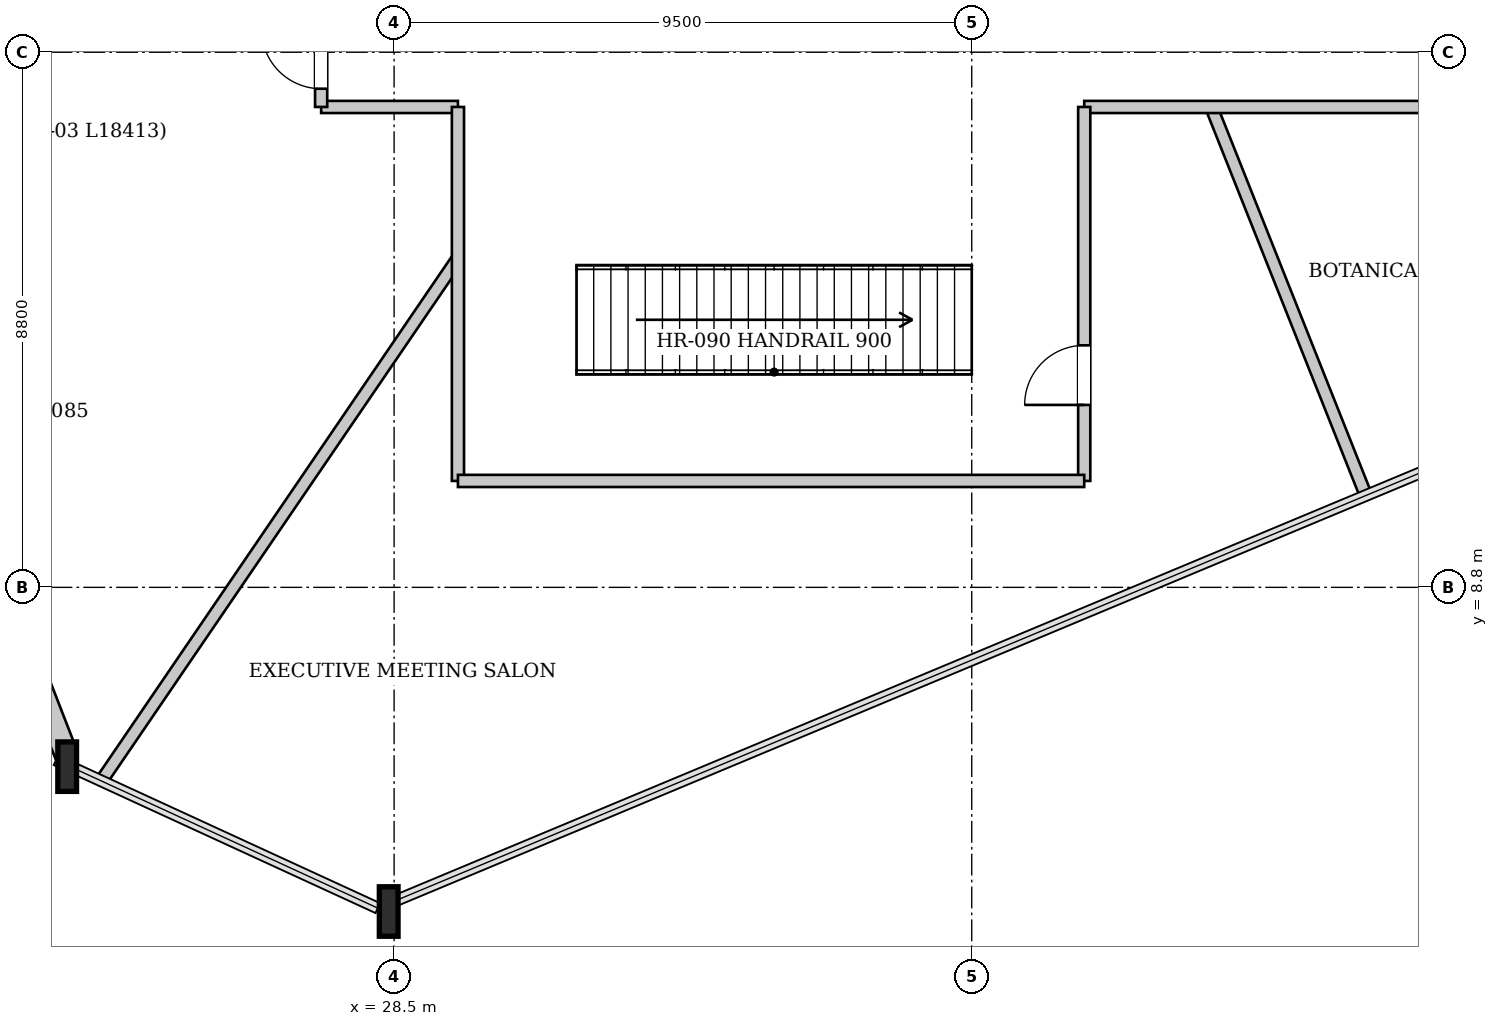
"""IFC4 building model, lengths in metres.
Left out: names, types, materials, properties, quantities, classifications, styles, units other than length and angle.
Written with IfcOpenShell. Run it as: python <this file> out.ifc"""

import sys

from ifc_helpers import new_model, si_unit, direction, frame, frame_2d, origin, origin_2d, place, context, subcontext, project, spatial, rectangle, i_section, extrude, source, transform, mapped, element, fill, save


model = new_model("IFC4")
c1 = context("Model", 3, precision=1e-05, world=origin(), true_north=direction((0.0, 1.0)))
c2 = subcontext(c1, "Body", "Model", "MODEL_VIEW")
j1 = project(units=[si_unit("LENGTHUNIT", "METRE"), si_unit("PLANEANGLEUNIT", "RADIAN")], contexts=[c1])
p1 = place(None, origin())
s1 = spatial("IfcSite", under=j1, at=p1, CompositionType="ELEMENT")
p2 = place(p1, origin())
s2 = spatial("IfcBuilding", under=s1, at=p2, CompositionType="ELEMENT")
p3 = place(p2, frame((0.0, 0.0, 71.9)))
s3 = spatial("IfcBuildingStorey", under=s2, at=p3, CompositionType="ELEMENT", Elevation=71.9)
m1 = source(origin(), c2, "Body", "SweptSolid", [
    extrude(i_section(OverallWidth=0.308, OverallDepth=0.814, WebThickness=0.021, FlangeThickness=0.04, at=origin_2d()), origin(), (0.0, 0.0, 1.0), 3.859),
])
p4 = place(p3, frame((22.939, 5.959, 0.0), z_axis=(0.095281359124, -0.055992033748, 0.99387441599), x_axis=(0.506644802413, 0.862154884106, 0.0)))
e1 = element("IfcColumn", 1, at=p4, inside=s3, PredefinedType="COLUMN", context=c2, shape_type="MappedRepresentation", body=[
    mapped(m1, transform((0.0, 0.0, 0.0), x_axis=(1.0, 0.0, 0.0), y_axis=(0.0, 1.0, 0.0), z_axis=(0.0, 0.0, 1.0), scale=1.0)),
])
m2 = source(origin(), c2, "Body", "SweptSolid", [
    extrude(i_section(OverallWidth=0.308, OverallDepth=0.814, WebThickness=0.021, FlangeThickness=0.04, at=origin_2d()), origin(), (0.0, 0.0, 1.0), 3.854),
])
p5 = place(p3, frame((28.232, 3.525, 0.0), z_axis=(0.093067685296, -0.029079692002, 0.995235036294), x_axis=(0.29823799613, 0.954491538812, 0.0)))
e2 = element("IfcColumn", 2, at=p5, inside=s3, PredefinedType="COLUMN", context=c2, shape_type="MappedRepresentation", body=[
    mapped(m2, transform((0.0, 0.0, 0.0), x_axis=(1.0, 0.0, 0.0), y_axis=(0.0, 1.0, 0.0), z_axis=(0.0, 0.0, 1.0), scale=1.0)),
])
p6 = place(p3, frame((23.116, 6.028, 0.0), z_axis=(0.0, 0.0, 1.0), x_axis=(-0.362290127774, 0.932065375023, 0.0)))
e3 = element("IfcWall", 3, at=p6, inside=s3, PredefinedType="SOLIDWALL", context=c2, shape_type="SweptSolid", body=[
    extrude(rectangle(XDim=18.412, YDim=0.38, at=frame_2d((9.206, 0.0))), origin(), (0.0, 0.0, 1.0), 3.042),
])
p7 = place(p6, frame((4.056, 0.0, 0.65)))
e4 = element("IfcOpeningElement", 4, at=p7, cuts=e3, PredefinedType="OPENING", context=c2, shape_type="SweptSolid", body=[
    extrude(rectangle(XDim=2.2, YDim=2.25, at=frame_2d((1.1, 1.125))), frame((0.0, 0.2, 0.0), z_axis=(0.0, -1.0, 0.0), x_axis=(1.0, 0.0, 0.0)), (0.0, 0.0, 1.0), 0.4),
])
p8 = place(p6, frame((12.157, 0.0, 0.65)))
e5 = element("IfcOpeningElement", 5, at=p8, cuts=e3, PredefinedType="OPENING", context=c2, shape_type="SweptSolid", body=[
    extrude(rectangle(XDim=2.2, YDim=2.25, at=frame_2d((1.1, 1.125))), frame((0.0, 0.2, 0.0), z_axis=(0.0, -1.0, 0.0), x_axis=(1.0, 0.0, 0.0)), (0.0, 0.0, 1.0), 0.4),
])
p9 = place(p3, frame((29.55, 14.213, 0.0), z_axis=(0.0, 0.0, 1.0), x_axis=(-0.563519334803, -0.826102874528, 0.0)))
e6 = element("IfcWall", 6, at=p9, inside=s3, PredefinedType="PARTITIONING", context=c2, shape_type="SweptSolid", body=[
    extrude(rectangle(XDim=10.376, YDim=0.2, at=frame_2d((5.188, 0.0))), origin(), (0.0, 0.0, 1.0), 3.245),
])
p10 = place(p3, frame((41.94, 16.7, 0.0), z_axis=(0.0, 0.0, 1.0), x_axis=(0.369724051114, -0.929141607091, 0.0)))
e7 = element("IfcWall", 7, at=p10, inside=s3, PredefinedType="PARTITIONING", context=c2, shape_type="SweptSolid", body=[
    extrude(rectangle(XDim=6.847, YDim=0.2, at=frame_2d((3.423, 0.0))), origin(), (0.0, 0.0, 1.0), 3.75),
])
p11 = place(p3, frame((27.3, 16.7, 0.0), z_axis=(0.0, 0.0, 1.0), x_axis=(1.0, 0.0, 0.0)))
e8 = element("IfcWall", 8, at=p11, inside=s3, PredefinedType="PARTITIONING", context=c2, shape_type="SweptSolid", body=[
    extrude(rectangle(XDim=2.25, YDim=0.2, at=frame_2d((1.125, 0.0))), origin(), (0.0, 0.0, 1.0), 3.75),
])
p12 = place(p3, frame((39.85, 16.7, 0.0), z_axis=(0.0, 0.0, 1.0), x_axis=(1.0, 0.0, 0.0)))
e9 = element("IfcWall", 9, at=p12, inside=s3, PredefinedType="PARTITIONING", context=c2, shape_type="SweptSolid", body=[
    extrude(rectangle(XDim=8.85, YDim=0.2, at=frame_2d((4.425, 0.0))), origin(), (0.0, 0.0, 1.0), 3.75),
])
p13 = place(p12, frame((7.135, 0.0, 0.0)))
e10 = element("IfcOpeningElement", 10, at=p13, cuts=e9, PredefinedType="OPENING", context=c2, shape_type="SweptSolid", body=[
    extrude(rectangle(XDim=0.98, YDim=2.15, at=frame_2d((0.49, 1.075))), frame((0.0, 0.11, 0.0), z_axis=(0.0, -1.0, 0.0), x_axis=(1.0, 0.0, 0.0)), (0.0, 0.0, 1.0), 0.22),
])
p14 = place(p3, frame((27.3, 16.7, 0.0), z_axis=(0.0, 0.0, 1.0), x_axis=(0.0, 1.0, 0.0)))
e11 = element("IfcWall", 11, at=p14, inside=s3, PredefinedType="PARTITIONING", context=c2, shape_type="SweptSolid", body=[
    extrude(rectangle(XDim=19.8, YDim=0.2, at=frame_2d((9.9, 0.0))), origin(), (0.0, 0.0, 1.0), 3.75),
])
p15 = place(p14, frame((14.2, 0.0, 0.0)))
e12 = element("IfcOpeningElement", 12, at=p15, cuts=e11, PredefinedType="OPENING", context=c2, shape_type="SweptSolid", body=[
    extrude(rectangle(XDim=0.98, YDim=2.15, at=frame_2d((0.49, 1.075))), frame((0.0, 0.11, 0.0), z_axis=(0.0, -1.0, 0.0), x_axis=(1.0, 0.0, 0.0)), (0.0, 0.0, 1.0), 0.22),
])
p16 = place(p14, frame((0.3, 0.0, 0.0)))
e13 = element("IfcOpeningElement", 13, at=p16, cuts=e11, PredefinedType="OPENING", context=c2, shape_type="SweptSolid", body=[
    extrude(rectangle(XDim=0.98, YDim=2.15, at=frame_2d((0.49, 1.075))), frame((0.0, 0.11, 0.0), z_axis=(0.0, -1.0, 0.0), x_axis=(1.0, 0.0, 0.0)), (0.0, 0.0, 1.0), 0.22),
])
p17 = place(p3, frame((29.55, 10.55, 0.0), z_axis=(0.0, 0.0, 1.0), x_axis=(0.0, 1.0, 0.0)))
e14 = element("IfcWall", 14, at=p17, inside=s3, PredefinedType="PARTITIONING", context=c2, shape_type="SweptSolid", body=[
    extrude(rectangle(XDim=6.15, YDim=0.2, at=frame_2d((3.075, 0.0))), origin(), (0.0, 0.0, 1.0), 3.75),
])
p18 = place(p3, frame((39.85, 10.55, 0.0), z_axis=(0.0, 0.0, 1.0), x_axis=(0.0, 1.0, 0.0)))
e15 = element("IfcWall", 15, at=p18, inside=s3, PredefinedType="PARTITIONING", context=c2, shape_type="SweptSolid", body=[
    extrude(rectangle(XDim=6.15, YDim=0.2, at=frame_2d((3.075, 0.0))), origin(), (0.0, 0.0, 1.0), 3.75),
])
p19 = place(p18, frame((1.25, 0.0, 0.0)))
e16 = element("IfcOpeningElement", 16, at=p19, cuts=e15, PredefinedType="OPENING", context=c2, shape_type="SweptSolid", body=[
    extrude(rectangle(XDim=0.98, YDim=2.15, at=frame_2d((0.49, 1.075))), frame((0.0, 0.11, 0.0), z_axis=(0.0, -1.0, 0.0), x_axis=(1.0, 0.0, 0.0)), (0.0, 0.0, 1.0), 0.22),
])
p20 = place(p3, frame((29.55, 10.55, 0.0), z_axis=(0.0, 0.0, 1.0), x_axis=(1.0, 0.0, 0.0)))
e17 = element("IfcWall", 17, at=p20, inside=s3, PredefinedType="PARTITIONING", context=c2, shape_type="SweptSolid", body=[
    extrude(rectangle(XDim=10.3, YDim=0.2, at=frame_2d((5.15, 0.0))), origin(), (0.0, 0.0, 1.0), 3.75),
])
m3 = source(origin(), c2, "Body", "SweptSolid", [
    extrude(rectangle(XDim=0.98, YDim=2.15, at=frame_2d((0.49, 1.075))), frame((0.0, 0.025, 0.0), z_axis=(0.0, -1.0, 0.0), x_axis=(1.0, 0.0, 0.0)), (0.0, 0.0, 1.0), 0.05),
])
p21 = place(p16, origin())
e18 = element("IfcDoor", 18, at=p21, inside=s3, OperationType="SINGLE_SWING_RIGHT", PredefinedType="DOOR", context=c2, shape_type="MappedRepresentation", body=[
    mapped(m3, transform((0.0, 0.0, 0.0), x_axis=(1.0, 0.0, 0.0), y_axis=(0.0, 1.0, 0.0), z_axis=(0.0, 0.0, 1.0), scale=1.0)),
])
fill(e13, e18)
p22 = place(p19, origin())
e19 = element("IfcDoor", 19, at=p22, inside=s3, OperationType="SINGLE_SWING_LEFT", PredefinedType="DOOR", context=c2, shape_type="MappedRepresentation", body=[
    mapped(m3, transform((0.0, 0.0, 0.0), x_axis=(1.0, 0.0, 0.0), y_axis=(0.0, 1.0, 0.0), z_axis=(0.0, 0.0, 1.0), scale=1.0)),
])
fill(e16, e19)
save(model, sys.argv[1])
